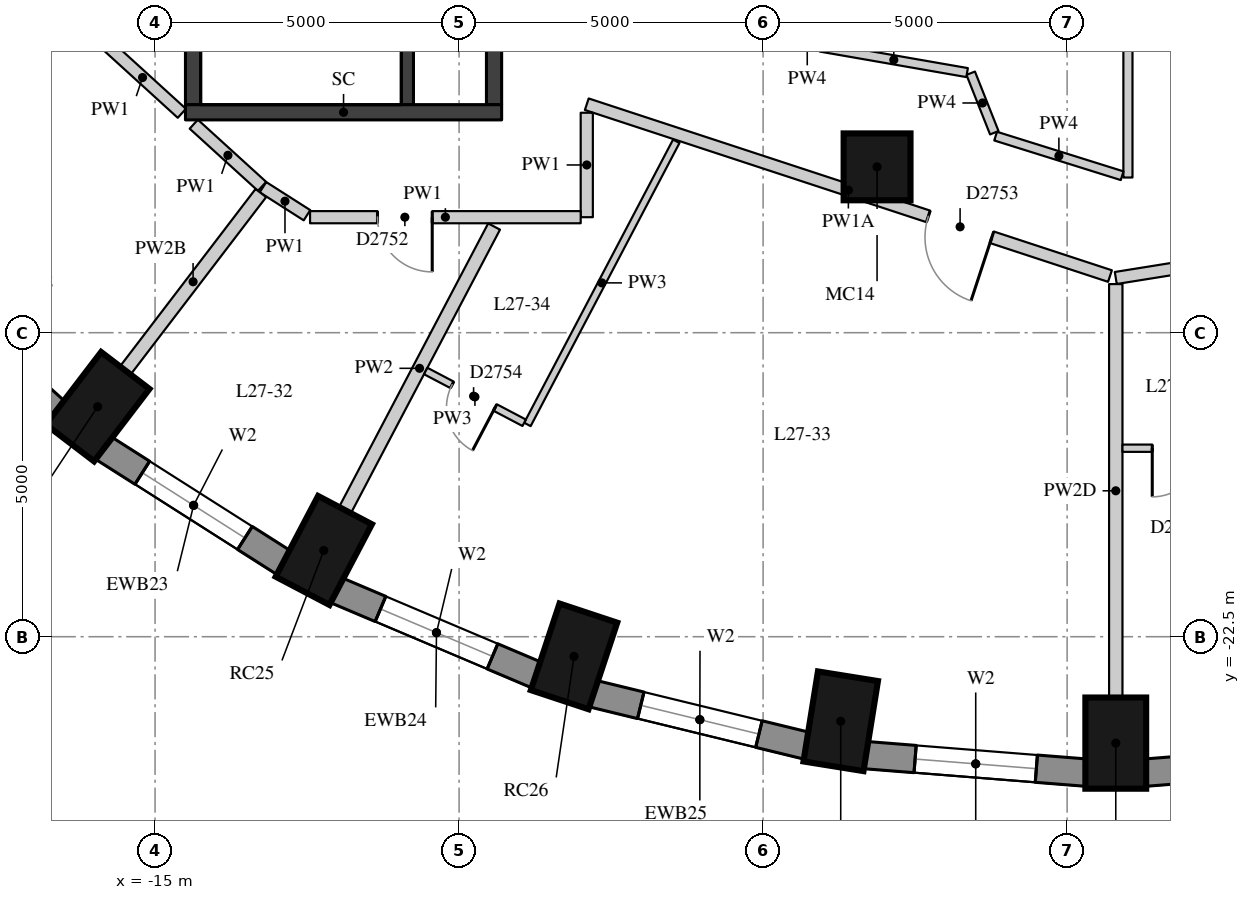
"""IFC4 building model, lengths in metres.
Left out: names, types, materials, properties, quantities, classifications, styles, units other than length and angle.
Written with IfcOpenShell. Run it as: python <this file> out.ifc"""

import sys

from ifc_helpers import new_model, si_unit, direction, frame, frame_2d, origin, origin_2d, place, context, subcontext, project, spatial, rectangle, extrude, element, fill, save


model = new_model("IFC4")
c1 = context("Model", 3, precision=1e-05, world=origin(), true_north=direction((0.0, 1.0)))
c2 = subcontext(c1, "Body", "Model", "MODEL_VIEW")
j1 = project(units=[si_unit("LENGTHUNIT", "METRE"), si_unit("PLANEANGLEUNIT", "RADIAN")], contexts=[c1])
p1 = place(None, origin())
s1 = spatial("IfcSite", under=j1, at=p1, CompositionType="ELEMENT")
p2 = place(p1, origin())
s2 = spatial("IfcBuilding", under=s1, at=p2, CompositionType="ELEMENT")
p3 = place(p2, frame((0.0, 0.0, 98.8)))
s3 = spatial("IfcBuildingStorey", under=s2, at=p3, CompositionType="ELEMENT", Elevation=98.8)
for number, where, z_axis, x_axis in (
    (1, (-15.945, -18.717, 0.0), (0.0, 0.0, 1.0), (-0.607, -0.795, 0.0)),
    (2, (-12.225, -21.082, 0.0), (0.0, 0.0, 1.0), (-0.465, -0.885, 0.0)),
    (3, (-8.11, -22.824, 0.0), (0.0, 0.0, 1.0), (-0.315, -0.949, 0.0)),
    (4, (-3.724, -23.891, 0.0), (0.0, 0.0, 1.0), (-0.159, -0.987, 0.0)),
    (5, (0.8, -24.25, 0.0), (0.0, 0.0, 1.0), (0.0, -1.0, 0.0)),
):
    element("IfcColumn", number, at=place(p3, frame(where, z_axis=z_axis, x_axis=x_axis)), inside=s3, PredefinedType="COLUMN", context=c2, shape_type="SweptSolid", body=[
        extrude(rectangle(XDim=1.5, YDim=1.0, at=origin_2d()), origin(), (0.0, 0.0, 1.0), 3.3),
    ])
p4 = place(p3, frame((-3.126, -14.772, 0.0), z_axis=(0.0, 0.0, 1.0), x_axis=(1.0, 0.0, 0.0)))
e6 = element("IfcColumn", 6, at=p4, inside=s3, PredefinedType="COLUMN", context=c2, shape_type="SweptSolid", body=[
    extrude(rectangle(XDim=1.1, YDim=1.1, at=origin_2d()), origin(), (0.0, 0.0, 1.0), 3.3),
])
p5 = place(p3, frame((-19.184, -16.481, 0.0), z_axis=(0.0, 0.0, 1.0), x_axis=(0.740364106106, -0.672206062446, 0.0)))
e7 = element("IfcWall", 7, at=p5, inside=s3, PredefinedType="SOLIDWALL", context=c2, shape_type="SweptSolid", body=[
    extrude(rectangle(XDim=3.464, YDim=0.45, at=frame_2d((1.732, 0.0))), origin(), (0.0, 0.0, 1.0), 3.02),
])
p6 = place(p5, frame((0.732, 0.0, 0.4)))
e8 = element("IfcOpeningElement", 8, at=p6, cuts=e7, PredefinedType="OPENING", context=c2, shape_type="SweptSolid", body=[
    extrude(rectangle(XDim=2.0, YDim=1.75, at=frame_2d((1.0, 0.875))), frame((0.0, 0.235, 0.0), z_axis=(0.0, -1.0, 0.0), x_axis=(1.0, 0.0, 0.0)), (0.0, 0.0, 1.0), 0.47),
])
p7 = place(p3, frame((-15.856, -19.392, 0.0), z_axis=(0.0, 0.0, 1.0), x_axis=(0.843891947083, -0.53651317006, 0.0)))
e9 = element("IfcWall", 9, at=p7, inside=s3, PredefinedType="SOLIDWALL", context=c2, shape_type="SweptSolid", body=[
    extrude(rectangle(XDim=3.532, YDim=0.45, at=frame_2d((1.766, 0.0))), origin(), (0.0, 0.0, 1.0), 3.02),
])
p8 = place(p7, frame((0.766, 0.0, 0.4)))
e10 = element("IfcOpeningElement", 10, at=p8, cuts=e9, PredefinedType="OPENING", context=c2, shape_type="SweptSolid", body=[
    extrude(rectangle(XDim=2.0, YDim=1.75, at=frame_2d((1.0, 0.875))), frame((0.0, 0.235, 0.0), z_axis=(0.0, -1.0, 0.0), x_axis=(1.0, 0.0, 0.0)), (0.0, 0.0, 1.0), 0.47),
])
p9 = place(p3, frame((-12.025, -21.733, 0.0), z_axis=(0.0, 0.0, 1.0), x_axis=(0.920879975612, -0.389846213932, 0.0)))
e11 = element("IfcWall", 11, at=p9, inside=s3, PredefinedType="SOLIDWALL", context=c2, shape_type="SweptSolid", body=[
    extrude(rectangle(XDim=3.592, YDim=0.45, at=frame_2d((1.796, 0.0))), origin(), (0.0, 0.0, 1.0), 3.02),
])
p10 = place(p9, frame((0.796, 0.0, 0.4)))
e12 = element("IfcOpeningElement", 12, at=p10, cuts=e11, PredefinedType="OPENING", context=c2, shape_type="SweptSolid", body=[
    extrude(rectangle(XDim=2.0, YDim=1.75, at=frame_2d((1.0, 0.875))), frame((0.0, 0.235, 0.0), z_axis=(0.0, -1.0, 0.0), x_axis=(1.0, 0.0, 0.0)), (0.0, 0.0, 1.0), 0.47),
])
p11 = place(p3, frame((-7.807, -23.435, 0.0), z_axis=(0.0, 0.0, 1.0), x_axis=(0.971667603162, -0.236351579148, 0.0)))
e13 = element("IfcWall", 13, at=p11, inside=s3, PredefinedType="SOLIDWALL", context=c2, shape_type="SweptSolid", body=[
    extrude(rectangle(XDim=3.635, YDim=0.45, at=frame_2d((1.817, 0.0))), origin(), (0.0, 0.0, 1.0), 3.02),
])
p12 = place(p11, frame((0.817, 0.0, 0.4)))
e14 = element("IfcOpeningElement", 14, at=p12, cuts=e13, PredefinedType="OPENING", context=c2, shape_type="SweptSolid", body=[
    extrude(rectangle(XDim=2.0, YDim=1.75, at=frame_2d((1.0, 0.875))), frame((0.0, 0.235, 0.0), z_axis=(0.0, -1.0, 0.0), x_axis=(1.0, 0.0, 0.0)), (0.0, 0.0, 1.0), 0.47),
])
p13 = place(p3, frame((-3.327, -24.447, 0.0), z_axis=(0.0, 0.0, 1.0), x_axis=(0.996862216754, -0.079156306178, 0.0)))
e15 = element("IfcWall", 15, at=p13, inside=s3, PredefinedType="SOLIDWALL", context=c2, shape_type="SweptSolid", body=[
    extrude(rectangle(XDim=3.658, YDim=0.45, at=frame_2d((1.829, 0.0))), origin(), (0.0, 0.0, 1.0), 3.02),
])
p14 = place(p13, frame((0.829, 0.0, 0.4)))
e16 = element("IfcOpeningElement", 16, at=p14, cuts=e15, PredefinedType="OPENING", context=c2, shape_type="SweptSolid", body=[
    extrude(rectangle(XDim=2.0, YDim=1.75, at=frame_2d((1.0, 0.875))), frame((0.0, 0.235, 0.0), z_axis=(0.0, -1.0, 0.0), x_axis=(1.0, 0.0, 0.0)), (0.0, 0.0, 1.0), 0.47),
])
p15 = place(p3, frame((1.28, -24.736, 0.0), z_axis=(0.0, 0.0, 1.0), x_axis=(0.996862216754, 0.079156306178, 0.0)))
e17 = element("IfcWall", 17, at=p15, inside=s3, PredefinedType="SOLIDWALL", context=c2, shape_type="SweptSolid", body=[
    extrude(rectangle(XDim=3.658, YDim=0.45, at=frame_2d((1.829, 0.0))), origin(), (0.0, 0.0, 1.0), 3.02),
])
p16 = place(p15, frame((0.829, 0.0, 0.4)))
e18 = element("IfcOpeningElement", 18, at=p16, cuts=e17, PredefinedType="OPENING", context=c2, shape_type="SweptSolid", body=[
    extrude(rectangle(XDim=2.0, YDim=1.75, at=frame_2d((1.0, 0.875))), frame((0.0, 0.235, 0.0), z_axis=(0.0, -1.0, 0.0), x_axis=(1.0, 0.0, 0.0)), (0.0, 0.0, 1.0), 0.47),
])
p17 = place(p3, frame((-10.85, -13.75, 0.0), z_axis=(0.0, 0.0, 1.0), x_axis=(0.0, 1.0, 0.0)))
e19 = element("IfcWall", 19, at=p17, inside=s3, PredefinedType="SHEAR", context=c2, shape_type="SweptSolid", body=[
    extrude(rectangle(XDim=6.0, YDim=0.2, at=frame_2d((3.0, 0.0))), origin(), (0.0, 0.0, 1.0), 3.02),
])
p18 = place(p17, frame((4.4, 0.0, 0.0)))
e20 = element("IfcOpeningElement", 20, at=p18, cuts=e19, PredefinedType="OPENING", context=c2, shape_type="SweptSolid", body=[
    extrude(rectangle(XDim=1.5, YDim=2.1, at=frame_2d((0.75, 1.05))), frame((0.0, 0.11, 0.0), z_axis=(0.0, -1.0, 0.0), x_axis=(1.0, 0.0, 0.0)), (0.0, 0.0, 1.0), 0.22),
])
p19 = place(p3, frame((-14.375, -13.75, -0.28), z_axis=(0.0, 0.0, 1.0), x_axis=(0.0, 1.0, 0.0)))
e21 = element("IfcWall", 21, at=p19, inside=s3, PredefinedType="SHEAR", context=c2, shape_type="SweptSolid", body=[
    extrude(rectangle(XDim=6.0, YDim=0.25, at=frame_2d((3.0, 0.0))), origin(), (0.0, 0.0, 1.0), 3.3),
])
p20 = place(p3, frame((-9.425, -13.75, -0.28), z_axis=(0.0, 0.0, 1.0), x_axis=(0.0, 1.0, 0.0)))
e22 = element("IfcWall", 22, at=p20, inside=s3, PredefinedType="SHEAR", context=c2, shape_type="SweptSolid", body=[
    extrude(rectangle(XDim=6.0, YDim=0.25, at=frame_2d((3.0, 0.0))), origin(), (0.0, 0.0, 1.0), 3.3),
])
p21 = place(p20, frame((2.4, 0.0, 0.28)))
e23 = element("IfcOpeningElement", 23, at=p21, cuts=e22, PredefinedType="OPENING", context=c2, shape_type="SweptSolid", body=[
    extrude(rectangle(XDim=1.5, YDim=2.1, at=frame_2d((0.75, 1.05))), frame((0.0, 0.135, 0.0), z_axis=(0.0, -1.0, 0.0), x_axis=(1.0, 0.0, 0.0)), (0.0, 0.0, 1.0), 0.27),
])
p22 = place(p3, frame((-14.5, -13.875, -0.28), z_axis=(0.0, 0.0, 1.0), x_axis=(1.0, 0.0, 0.0)))
e24 = element("IfcWall", 24, at=p22, inside=s3, PredefinedType="SHEAR", context=c2, shape_type="SweptSolid", body=[
    extrude(rectangle(XDim=5.2, YDim=0.25, at=frame_2d((2.6, 0.0))), origin(), (0.0, 0.0, 1.0), 3.3),
])
p23 = place(p3, frame((-14.56, -13.891, 0.0), z_axis=(0.0, 0.0, 1.0), x_axis=(-0.739440483737, 0.673221932954, 0.0)))
e25 = element("IfcWall", 25, at=p23, inside=s3, PredefinedType="PARTITIONING", context=c2, shape_type="SweptSolid", body=[
    extrude(rectangle(XDim=1.748, YDim=0.2, at=frame_2d((0.874, 0.0))), origin(), (0.0, 0.0, 1.0), 3.02),
])
p24 = place(p3, frame((7.284, -15.561, 0.0), z_axis=(0.0, 0.0, 1.0), x_axis=(-0.987409293733, -0.158186240393, 0.0)))
e26 = element("IfcWall", 26, at=p24, inside=s3, PredefinedType="PARTITIONING", context=c2, shape_type="SweptSolid", body=[
    extrude(rectangle(XDim=6.567, YDim=0.2, at=frame_2d((3.284, 0.0))), origin(), (0.0, 0.0, 1.0), 3.02),
])
p25 = place(p24, frame((2.057, 0.0, 0.0)))
e27 = element("IfcOpeningElement", 27, at=p25, cuts=e26, PredefinedType="OPENING", context=c2, shape_type="SweptSolid", body=[
    extrude(rectangle(XDim=1.1, YDim=2.1, at=frame_2d((0.55, 1.05))), frame((0.0, 0.11, 0.0), z_axis=(0.0, -1.0, 0.0), x_axis=(1.0, 0.0, 0.0)), (0.0, 0.0, 1.0), 0.22),
])
p26 = place(p3, frame((0.705, -16.568, 0.0), z_axis=(0.0, 0.0, 1.0), x_axis=(-0.950067715644, 0.312043804122, 0.0)))
e28 = element("IfcWall", 28, at=p26, inside=s3, PredefinedType="PARTITIONING", context=c2, shape_type="SweptSolid", body=[
    extrude(rectangle(XDim=9.057, YDim=0.2, at=frame_2d((4.528, 0.0))), origin(), (0.0, 0.0, 1.0), 2.57),
])
p27 = place(p26, frame((2.045, 0.0, 0.0)))
e29 = element("IfcOpeningElement", 29, at=p27, cuts=e28, PredefinedType="OPENING", context=c2, shape_type="SweptSolid", body=[
    extrude(rectangle(XDim=1.1, YDim=2.1, at=frame_2d((0.55, 1.05))), frame((0.0, 0.11, 0.0), z_axis=(0.0, -1.0, 0.0), x_axis=(1.0, 0.0, 0.0)), (0.0, 0.0, 1.0), 0.22),
])
p28 = place(p3, frame((-7.9, -13.882, 0.0), z_axis=(0.0, 0.0, 1.0), x_axis=(0.0, -1.0, 0.0)))
e30 = element("IfcWall", 30, at=p28, inside=s3, PredefinedType="PARTITIONING", context=c2, shape_type="SweptSolid", body=[
    extrude(rectangle(XDim=1.718, YDim=0.2, at=frame_2d((0.859, 0.0))), origin(), (0.0, 0.0, 1.0), 3.02),
])
p29 = place(p3, frame((-8.0, -15.6, 0.0), z_axis=(0.0, 0.0, 1.0), x_axis=(-1.0, 0.0, 0.0)))
e31 = element("IfcWall", 31, at=p29, inside=s3, PredefinedType="PARTITIONING", context=c2, shape_type="SweptSolid", body=[
    extrude(rectangle(XDim=4.451, YDim=0.2, at=frame_2d((2.226, 0.0))), origin(), (0.0, 0.0, 1.0), 3.02),
])
p30 = place(p29, frame((2.442, 0.0, 0.0)))
e32 = element("IfcOpeningElement", 32, at=p30, cuts=e31, PredefinedType="OPENING", context=c2, shape_type="SweptSolid", body=[
    extrude(rectangle(XDim=0.9, YDim=2.1, at=frame_2d((0.45, 1.05))), frame((0.0, 0.11, 0.0), z_axis=(0.0, -1.0, 0.0), x_axis=(1.0, 0.0, 0.0)), (0.0, 0.0, 1.0), 0.22),
])
p31 = place(p3, frame((-12.501, -15.568, 0.0), z_axis=(0.0, 0.0, 1.0), x_axis=(-0.843169167706, 0.537648355926, 0.0)))
e33 = element("IfcWall", 33, at=p31, inside=s3, PredefinedType="PARTITIONING", context=c2, shape_type="SweptSolid", body=[
    extrude(rectangle(XDim=0.858, YDim=0.2, at=frame_2d((0.429, 0.0))), origin(), (0.0, 0.0, 1.0), 3.02),
])
p32 = place(p3, frame((-13.24, -15.093, 0.0), z_axis=(0.0, 0.0, 1.0), x_axis=(-0.739438095557, 0.673224556028, 0.0)))
e34 = element("IfcWall", 34, at=p32, inside=s3, PredefinedType="PARTITIONING", context=c2, shape_type="SweptSolid", body=[
    extrude(rectangle(XDim=1.519, YDim=0.2, at=frame_2d((0.76, 0.0))), origin(), (0.0, 0.0, 1.0), 3.02),
])
p33 = place(p3, frame((1.0, -9.23, 0.0), z_axis=(0.0, 0.0, 1.0), x_axis=(0.0, -1.0, 0.0)))
e35 = element("IfcWall", 35, at=p33, inside=s3, PredefinedType="PARTITIONING", context=c2, shape_type="SweptSolid", body=[
    extrude(rectangle(XDim=5.718, YDim=0.15, at=frame_2d((2.859, 0.0))), origin(), (0.0, 0.0, 1.0), 3.02),
])
p34 = place(p3, frame((0.905, -14.918, 0.0), z_axis=(0.0, 0.0, 1.0), x_axis=(-0.954324426349, 0.298772303391, 0.0)))
e36 = element("IfcWall", 36, at=p34, inside=s3, PredefinedType="PARTITIONING", context=c2, shape_type="SweptSolid", body=[
    extrude(rectangle(XDim=2.18, YDim=0.15, at=frame_2d((1.09, 0.0))), origin(), (0.0, 0.0, 1.0), 3.02),
])
p35 = place(p3, frame((-1.198, -14.211, 0.0), z_axis=(0.0, 0.0, 1.0), x_axis=(-0.368390833177, 0.929671013871, 0.0)))
e37 = element("IfcWall", 37, at=p35, inside=s3, PredefinedType="PARTITIONING", context=c2, shape_type="SweptSolid", body=[
    extrude(rectangle(XDim=1.053, YDim=0.15, at=frame_2d((0.526, 0.0))), origin(), (0.0, 0.0, 1.0), 3.02),
])
p36 = place(p3, frame((-1.645, -13.222, 0.0), z_axis=(0.0, 0.0, 1.0), x_axis=(-0.985187584004, 0.171480098917, 0.0)))
e38 = element("IfcWall", 38, at=p36, inside=s3, PredefinedType="PARTITIONING", context=c2, shape_type="SweptSolid", body=[
    extrude(rectangle(XDim=2.447, YDim=0.15, at=frame_2d((1.224, 0.0))), origin(), (0.0, 0.0, 1.0), 3.02),
])
p37 = place(p3, frame((-15.489, -18.121, 0.0), z_axis=(0.0, 0.0, 1.0), x_axis=(0.607082337972, 0.794638933681, 0.0)))
e39 = element("IfcWall", 39, at=p37, inside=s3, PredefinedType="PARTITIONING", context=c2, shape_type="SweptSolid", body=[
    extrude(rectangle(XDim=3.672, YDim=0.22, at=frame_2d((1.836, 0.0))), origin(), (0.0, 0.0, 1.0), 2.57),
])
p38 = place(p3, frame((-11.876, -20.418, 0.0), z_axis=(0.0, 0.0, 1.0), x_axis=(0.465320539057, 0.885142246157, 0.0)))
e40 = element("IfcWall", 40, at=p38, inside=s3, PredefinedType="PARTITIONING", context=c2, shape_type="SweptSolid", body=[
    extrude(rectangle(XDim=5.269, YDim=0.22, at=frame_2d((2.635, 0.0))), origin(), (0.0, 0.0, 1.0), 3.02),
])
p39 = place(p3, frame((0.8, -23.5, 0.0), z_axis=(0.0, 0.0, 1.0), x_axis=(0.0, 1.0, 0.0)))
e41 = element("IfcWall", 41, at=p39, inside=s3, PredefinedType="PARTITIONING", context=c2, shape_type="SweptSolid", body=[
    extrude(rectangle(XDim=6.8, YDim=0.22, at=frame_2d((3.4, 0.0))), origin(), (0.0, 0.0, 1.0), 2.47),
])
p40 = place(p3, frame((-6.428, -14.352, 0.0), z_axis=(0.0, 0.0, 1.0), x_axis=(-0.46531034676, -0.885147604187, 0.0)))
e42 = element("IfcWall", 42, at=p40, inside=s3, PredefinedType="PARTITIONING", context=c2, shape_type="SweptSolid", body=[
    extrude(rectangle(XDim=5.261, YDim=0.12, at=frame_2d((2.631, 0.0))), origin(), (0.0, 0.0, 1.0), 3.02),
])
p41 = place(p3, frame((-8.929, -18.981, 0.0), z_axis=(0.0, 0.0, 1.0), x_axis=(-0.885114946598, 0.465372465139, 0.0)))
e43 = element("IfcWall", 43, at=p41, inside=s3, PredefinedType="PARTITIONING", context=c2, shape_type="SweptSolid", body=[
    extrude(rectangle(XDim=1.83, YDim=0.12, at=frame_2d((0.915, 0.0))), origin(), (0.0, 0.0, 1.0), 3.02),
])
p42 = place(p41, frame((0.54, 0.0, 0.0)))
e44 = element("IfcOpeningElement", 44, at=p42, cuts=e43, PredefinedType="OPENING", context=c2, shape_type="SweptSolid", body=[
    extrude(rectangle(XDim=0.8, YDim=2.1, at=frame_2d((0.4, 1.05))), frame((0.0, 0.07, 0.0), z_axis=(0.0, -1.0, 0.0), x_axis=(1.0, 0.0, 0.0)), (0.0, 0.0, 1.0), 0.14),
])
p43 = place(p3, frame((2.74, -19.4, 0.0), z_axis=(0.0, 0.0, 1.0), x_axis=(-1.0, 0.0, 0.0)))
e45 = element("IfcWall", 45, at=p43, inside=s3, PredefinedType="PARTITIONING", context=c2, shape_type="SweptSolid", body=[
    extrude(rectangle(XDim=1.83, YDim=0.12, at=frame_2d((0.915, 0.0))), origin(), (0.0, 0.0, 1.0), 3.02),
])
p44 = place(p43, frame((0.54, 0.0, 0.0)))
e46 = element("IfcOpeningElement", 46, at=p44, cuts=e45, PredefinedType="OPENING", context=c2, shape_type="SweptSolid", body=[
    extrude(rectangle(XDim=0.8, YDim=2.1, at=frame_2d((0.4, 1.05))), frame((0.0, 0.07, 0.0), z_axis=(0.0, -1.0, 0.0), x_axis=(1.0, 0.0, 0.0)), (0.0, 0.0, 1.0), 0.14),
])
p45 = place(p8, origin())
e47 = element("IfcWindow", 47, at=p45, inside=s3, PartitioningType="SINGLE_PANEL", PredefinedType="WINDOW", context=c2, shape_type="SweptSolid", body=[
    extrude(rectangle(XDim=2.0, YDim=1.75, at=frame_2d((1.0, 0.875))), frame((0.0, 0.035, 0.0), z_axis=(0.0, -1.0, 0.0), x_axis=(1.0, 0.0, 0.0)), (0.0, 0.0, 1.0), 0.06),
])
fill(e10, e47)
p46 = place(p10, origin())
e48 = element("IfcWindow", 48, at=p46, inside=s3, PartitioningType="SINGLE_PANEL", PredefinedType="WINDOW", context=c2, shape_type="SweptSolid", body=[
    extrude(rectangle(XDim=2.0, YDim=1.75, at=frame_2d((1.0, 0.875))), frame((0.0, 0.035, 0.0), z_axis=(0.0, -1.0, 0.0), x_axis=(1.0, 0.0, 0.0)), (0.0, 0.0, 1.0), 0.06),
])
fill(e12, e48)
p47 = place(p12, origin())
e49 = element("IfcWindow", 49, at=p47, inside=s3, PartitioningType="SINGLE_PANEL", PredefinedType="WINDOW", context=c2, shape_type="SweptSolid", body=[
    extrude(rectangle(XDim=2.0, YDim=1.75, at=frame_2d((1.0, 0.875))), frame((0.0, 0.035, 0.0), z_axis=(0.0, -1.0, 0.0), x_axis=(1.0, 0.0, 0.0)), (0.0, 0.0, 1.0), 0.06),
])
fill(e14, e49)
p48 = place(p14, origin())
e50 = element("IfcWindow", 50, at=p48, inside=s3, PartitioningType="SINGLE_PANEL", PredefinedType="WINDOW", context=c2, shape_type="SweptSolid", body=[
    extrude(rectangle(XDim=2.0, YDim=1.75, at=frame_2d((1.0, 0.875))), frame((0.0, 0.035, 0.0), z_axis=(0.0, -1.0, 0.0), x_axis=(1.0, 0.0, 0.0)), (0.0, 0.0, 1.0), 0.06),
])
fill(e16, e50)
p49 = place(p30, origin())
e51 = element("IfcDoor", 51, at=p49, inside=s3, OperationType="SINGLE_SWING_LEFT", PredefinedType="DOOR", context=c2, shape_type="SweptSolid", body=[
    extrude(rectangle(XDim=0.9, YDim=2.1, at=frame_2d((0.45, 1.05))), frame((0.0, 0.025, 0.0), z_axis=(0.0, -1.0, 0.0), x_axis=(1.0, 0.0, 0.0)), (0.0, 0.0, 1.0), 0.05),
])
fill(e32, e51)
p50 = place(p27, origin())
e52 = element("IfcDoor", 52, at=p50, inside=s3, OperationType="SINGLE_SWING_LEFT", PredefinedType="DOOR", context=c2, shape_type="SweptSolid", body=[
    extrude(rectangle(XDim=1.1, YDim=2.1, at=frame_2d((0.55, 1.05))), frame((0.0, 0.025, 0.0), z_axis=(0.0, -1.0, 0.0), x_axis=(1.0, 0.0, 0.0)), (0.0, 0.0, 1.0), 0.05),
])
fill(e29, e52)
p51 = place(p42, origin())
e53 = element("IfcDoor", 53, at=p51, inside=s3, OperationType="SINGLE_SWING_LEFT", PredefinedType="DOOR", context=c2, shape_type="SweptSolid", body=[
    extrude(rectangle(XDim=0.8, YDim=2.1, at=frame_2d((0.4, 1.05))), frame((0.0, 0.025, 0.0), z_axis=(0.0, -1.0, 0.0), x_axis=(1.0, 0.0, 0.0)), (0.0, 0.0, 1.0), 0.05),
])
fill(e44, e53)
p52 = place(p44, origin())
e54 = element("IfcDoor", 54, at=p52, inside=s3, OperationType="SINGLE_SWING_RIGHT", PredefinedType="DOOR", context=c2, shape_type="SweptSolid", body=[
    extrude(rectangle(XDim=0.8, YDim=2.1, at=frame_2d((0.4, 1.05))), frame((0.0, 0.025, 0.0), z_axis=(0.0, -1.0, 0.0), x_axis=(1.0, 0.0, 0.0)), (0.0, 0.0, 1.0), 0.05),
])
fill(e46, e54)
save(model, sys.argv[1])
